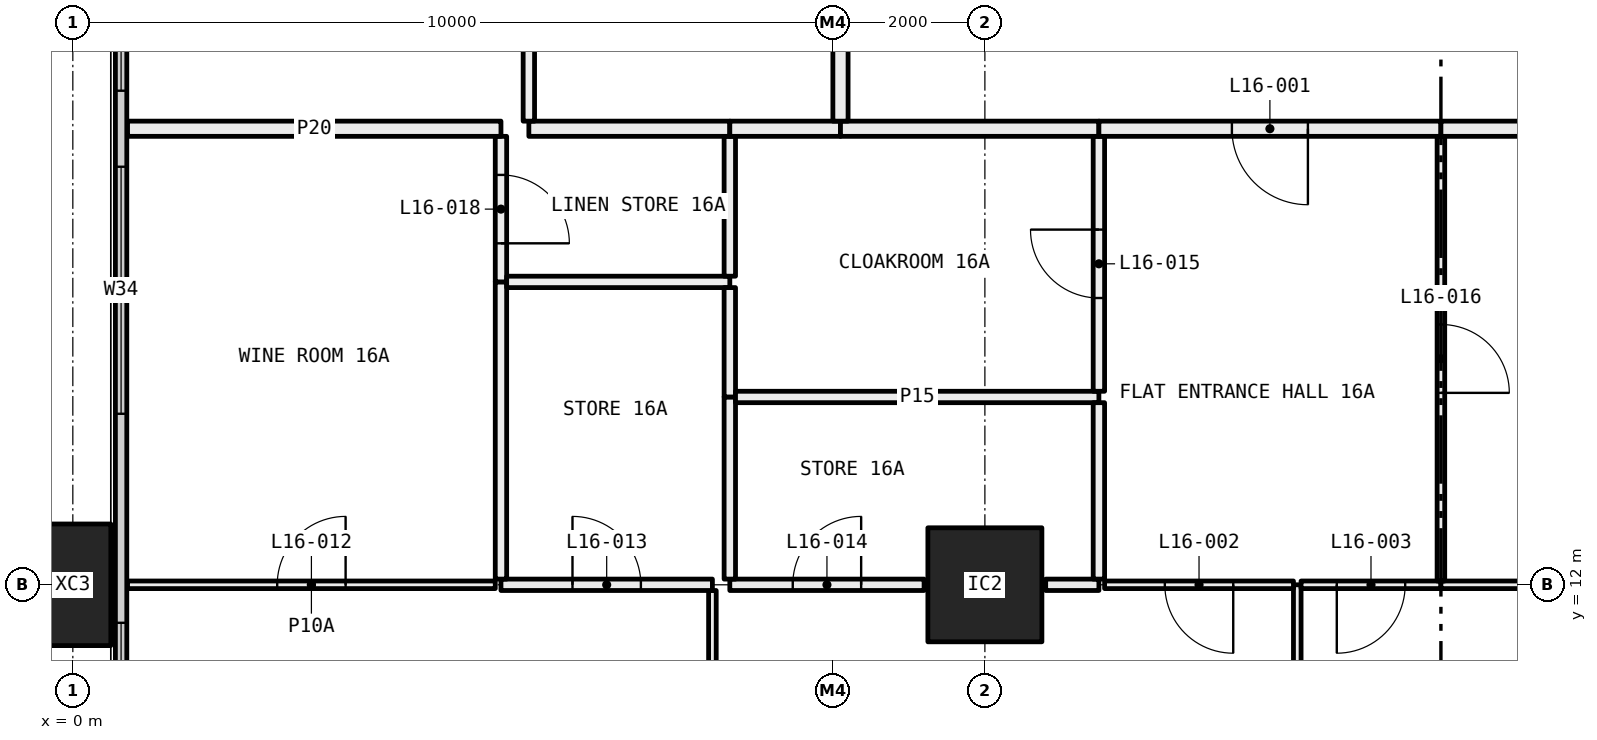
"""IFC4 building model, lengths in metres.
Left out: names, types, materials, properties, quantities, classifications, styles, units other than length and angle.
Written with IfcOpenShell. Run it as: python <this file> out.ifc"""

import sys

from ifc_helpers import new_model, si_unit, direction, frame, frame_2d, origin, origin_2d, place, context, subcontext, project, spatial, rectangle, hollow_rectangle, extrude, element, fill, save


model = new_model("IFC4")
c1 = context("Model", 3, precision=1e-05, world=origin(), true_north=direction((0.0, 1.0)))
c2 = subcontext(c1, "Body", "Model", "MODEL_VIEW")
j1 = project(units=[si_unit("LENGTHUNIT", "METRE"), si_unit("PLANEANGLEUNIT", "RADIAN")], contexts=[c1])
p1 = place(None, origin())
s1 = spatial("IfcSite", under=j1, at=p1, CompositionType="ELEMENT")
p2 = place(p1, origin())
s2 = spatial("IfcBuilding", under=s1, at=p2, CompositionType="ELEMENT")
p3 = place(p2, frame((0.0, 0.0, 67.95)))
s3 = spatial("IfcBuildingStorey", under=s2, at=p3, CompositionType="ELEMENT", Elevation=67.95)
p4 = place(p3, frame((0.0, 12.0, -0.4), z_axis=(0.0, 0.0, 1.0), x_axis=(0.0, 1.0, 0.0)))
e1 = element("IfcColumn", 1, at=p4, inside=s3, PredefinedType="COLUMN", context=c2, shape_type="SweptSolid", body=[
    extrude(hollow_rectangle(XDim=1.6, YDim=1.0, WallThickness=0.065, at=origin_2d()), origin(), (0.0, 0.0, 1.0), 3.45),
])
p5 = place(p3, frame((12.0, 12.0, 0.0), z_axis=(0.0, 0.0, 1.0), x_axis=(1.0, 0.0, 0.0)))
e2 = element("IfcColumn", 2, at=p5, inside=s3, PredefinedType="COLUMN", context=c2, shape_type="SweptSolid", body=[
    extrude(hollow_rectangle(XDim=1.5, YDim=1.5, WallThickness=0.065, at=origin_2d()), origin(), (0.0, 0.0, 1.0), 3.05),
])
p6 = place(p3, frame((0.635, 6.71, 0.0), z_axis=(0.0, 0.0, 1.0), x_axis=(0.0, 1.0, 0.0)))
e3 = element("IfcWall", 3, at=p6, inside=s3, PredefinedType="ELEMENTEDWALL", context=c2, shape_type="SweptSolid", body=[
    extrude(rectangle(XDim=34.58, YDim=0.15, at=frame_2d((17.29, 0.0))), origin(), (0.0, 0.0, 1.0), 3.05),
])
p7 = place(p6, frame((0.29, 0.0, 0.45)))
e4 = element("IfcOpeningElement", 4, at=p7, cuts=e3, PredefinedType="OPENING", context=c2, shape_type="SweptSolid", body=[
    extrude(rectangle(XDim=4.5, YDim=2.55, at=frame_2d((2.25, 1.275))), frame((0.0, 0.085, 0.0), z_axis=(0.0, -1.0, 0.0), x_axis=(1.0, 0.0, 0.0)), (0.0, 0.0, 1.0), 0.17),
])
p8 = place(p6, frame((7.54, 0.0, 0.45)))
e5 = element("IfcOpeningElement", 5, at=p8, cuts=e3, PredefinedType="OPENING", context=c2, shape_type="SweptSolid", body=[
    extrude(rectangle(XDim=3.25, YDim=2.55, at=frame_2d((1.625, 1.275))), frame((0.0, 0.085, 0.0), z_axis=(0.0, -1.0, 0.0), x_axis=(1.0, 0.0, 0.0)), (0.0, 0.0, 1.0), 0.17),
])
p9 = place(p6, frame((11.79, 0.0, 0.45)))
e6 = element("IfcOpeningElement", 6, at=p9, cuts=e3, PredefinedType="OPENING", context=c2, shape_type="SweptSolid", body=[
    extrude(rectangle(XDim=3.25, YDim=2.55, at=frame_2d((1.625, 1.275))), frame((0.0, 0.085, 0.0), z_axis=(0.0, -1.0, 0.0), x_axis=(1.0, 0.0, 0.0)), (0.0, 0.0, 1.0), 0.17),
])
p10 = place(p6, frame((19.54, 0.0, 0.45)))
e7 = element("IfcOpeningElement", 7, at=p10, cuts=e3, PredefinedType="OPENING", context=c2, shape_type="SweptSolid", body=[
    extrude(rectangle(XDim=3.25, YDim=2.55, at=frame_2d((1.625, 1.275))), frame((0.0, 0.085, 0.0), z_axis=(0.0, -1.0, 0.0), x_axis=(1.0, 0.0, 0.0)), (0.0, 0.0, 1.0), 0.17),
])
p11 = place(p6, frame((23.79, 0.0, 0.45)))
e8 = element("IfcOpeningElement", 8, at=p11, cuts=e3, PredefinedType="OPENING", context=c2, shape_type="SweptSolid", body=[
    extrude(rectangle(XDim=2.0, YDim=2.55, at=frame_2d((1.0, 1.275))), frame((0.0, 0.085, 0.0), z_axis=(0.0, -1.0, 0.0), x_axis=(1.0, 0.0, 0.0)), (0.0, 0.0, 1.0), 0.17),
])
p12 = place(p6, frame((29.79, 0.0, 0.45)))
e9 = element("IfcOpeningElement", 9, at=p12, cuts=e3, PredefinedType="OPENING", context=c2, shape_type="SweptSolid", body=[
    extrude(rectangle(XDim=4.5, YDim=2.55, at=frame_2d((2.25, 1.275))), frame((0.0, 0.085, 0.0), z_axis=(0.0, -1.0, 0.0), x_axis=(1.0, 0.0, 0.0)), (0.0, 0.0, 1.0), 0.17),
])
p13 = place(p3, frame((8.415, 6.05, 0.0), z_axis=(0.0, 0.0, 1.0), x_axis=(0.0, 1.0, 0.0)))
e10 = element("IfcWall", 10, at=p13, inside=s3, PredefinedType="PARTITIONING", context=c2, shape_type="SweptSolid", body=[
    extrude(rectangle(XDim=5.875, YDim=0.1, at=frame_2d((2.938, 0.0))), origin(), (0.0, 0.0, 1.0), 2.45),
])
p14 = place(p13, frame((2.488, 0.0, 0.0)))
e11 = element("IfcOpeningElement", 11, at=p14, cuts=e10, PredefinedType="OPENING", context=c2, shape_type="SweptSolid", body=[
    extrude(rectangle(XDim=0.9, YDim=2.1, at=frame_2d((0.45, 1.05))), frame((0.0, 0.06, 0.0), z_axis=(0.0, -1.0, 0.0), x_axis=(1.0, 0.0, 0.0)), (0.0, 0.0, 1.0), 0.12),
])
p15 = place(p3, frame((5.558, 12.0, 0.0), z_axis=(0.0, 0.0, 1.0), x_axis=(-1.0, 0.0, 0.0)))
e12 = element("IfcWall", 12, at=p15, inside=s3, PredefinedType="PARTITIONING", context=c2, shape_type="SweptSolid", body=[
    extrude(rectangle(XDim=4.838, YDim=0.1, at=frame_2d((2.419, 0.0))), origin(), (0.0, 0.0, 1.0), 2.45),
])
p16 = place(p15, frame((1.969, 0.0, 0.0)))
e13 = element("IfcOpeningElement", 13, at=p16, cuts=e12, PredefinedType="OPENING", context=c2, shape_type="SweptSolid", body=[
    extrude(rectangle(XDim=0.9, YDim=2.1, at=frame_2d((0.45, 1.05))), frame((0.0, 0.06, 0.0), z_axis=(0.0, -1.0, 0.0), x_axis=(1.0, 0.0, 0.0)), (0.0, 0.0, 1.0), 0.12),
])
p17 = place(p3, frame((8.415, 12.0, 0.0), z_axis=(0.0, 0.0, 1.0), x_axis=(-1.0, 0.0, 0.0)))
e14 = element("IfcWall", 14, at=p17, inside=s3, PredefinedType="PARTITIONING", context=c2, shape_type="SweptSolid", body=[
    extrude(rectangle(XDim=2.782, YDim=0.15, at=frame_2d((1.391, 0.0))), origin(), (0.0, 0.0, 1.0), 2.45),
])
p18 = place(p17, frame((0.941, 0.0, 0.0)))
e15 = element("IfcOpeningElement", 15, at=p18, cuts=e14, PredefinedType="OPENING", context=c2, shape_type="SweptSolid", body=[
    extrude(rectangle(XDim=0.9, YDim=2.1, at=frame_2d((0.45, 1.05))), frame((0.0, 0.085, 0.0), z_axis=(0.0, -1.0, 0.0), x_axis=(1.0, 0.0, 0.0)), (0.0, 0.0, 1.0), 0.17),
])
p19 = place(p3, frame((16.11, 6.05, 0.0), z_axis=(0.0, 0.0, 1.0), x_axis=(0.0, 1.0, 0.0)))
e16 = element("IfcWall", 16, at=p19, inside=s3, PredefinedType="PARTITIONING", context=c2, shape_type="SweptSolid", body=[
    extrude(rectangle(XDim=5.95, YDim=0.1, at=frame_2d((2.975, 0.0))), origin(), (0.0, 0.0, 1.0), 2.45),
])
p20 = place(p3, frame((11.2, 12.0, 0.0), z_axis=(0.0, 0.0, 1.0), x_axis=(-1.0, 0.0, 0.0)))
e17 = element("IfcWall", 17, at=p20, inside=s3, PredefinedType="PARTITIONING", context=c2, shape_type="SweptSolid", body=[
    extrude(rectangle(XDim=2.556, YDim=0.15, at=frame_2d((1.278, 0.0))), origin(), (0.0, 0.0, 1.0), 2.45),
])
p21 = place(p20, frame((0.828, 0.0, 0.0)))
e18 = element("IfcOpeningElement", 18, at=p21, cuts=e17, PredefinedType="OPENING", context=c2, shape_type="SweptSolid", body=[
    extrude(rectangle(XDim=0.9, YDim=2.1, at=frame_2d((0.45, 1.05))), frame((0.0, 0.085, 0.0), z_axis=(0.0, -1.0, 0.0), x_axis=(1.0, 0.0, 0.0)), (0.0, 0.0, 1.0), 0.17),
])
p22 = place(p3, frame((13.5, 12.0, 0.0), z_axis=(0.0, 0.0, 1.0), x_axis=(-1.0, 0.0, 0.0)))
e19 = element("IfcWall", 19, at=p22, inside=s3, PredefinedType="PARTITIONING", context=c2, shape_type="SweptSolid", body=[
    extrude(rectangle(XDim=0.7, YDim=0.15, at=frame_2d((0.35, 0.0))), origin(), (0.0, 0.0, 1.0), 2.45),
])
p23 = place(p3, frame((16.06, 12.0, 0.0), z_axis=(0.0, 0.0, 1.0), x_axis=(-1.0, 0.0, 0.0)))
e20 = element("IfcWall", 20, at=p23, inside=s3, PredefinedType="PARTITIONING", context=c2, shape_type="SweptSolid", body=[
    extrude(rectangle(XDim=2.485, YDim=0.1, at=frame_2d((1.243, 0.0))), origin(), (0.0, 0.0, 1.0), 2.45),
])
p24 = place(p23, frame((0.792, 0.0, 0.0)))
e21 = element("IfcOpeningElement", 21, at=p24, cuts=e20, PredefinedType="OPENING", context=c2, shape_type="SweptSolid", body=[
    extrude(rectangle(XDim=0.9, YDim=2.1, at=frame_2d((0.45, 1.05))), frame((0.0, 0.06, 0.0), z_axis=(0.0, -1.0, 0.0), x_axis=(1.0, 0.0, 0.0)), (0.0, 0.0, 1.0), 0.12),
])
p25 = place(p3, frame((18.0, 12.0, 0.0), z_axis=(0.0, 0.0, 1.0), x_axis=(-1.0, 0.0, 0.0)))
e22 = element("IfcWall", 22, at=p25, inside=s3, PredefinedType="PARTITIONING", context=c2, shape_type="SweptSolid", body=[
    extrude(rectangle(XDim=1.84, YDim=0.1, at=frame_2d((0.92, 0.0))), origin(), (0.0, 0.0, 1.0), 2.45),
])
p26 = place(p25, frame((0.47, 0.0, 0.0)))
e23 = element("IfcOpeningElement", 23, at=p26, cuts=e22, PredefinedType="OPENING", context=c2, shape_type="SweptSolid", body=[
    extrude(rectangle(XDim=0.9, YDim=2.1, at=frame_2d((0.45, 1.05))), frame((0.0, 0.06, 0.0), z_axis=(0.0, -1.0, 0.0), x_axis=(1.0, 0.0, 0.0)), (0.0, 0.0, 1.0), 0.12),
])
p27 = place(p3, frame((23.2, 12.0, 0.0), z_axis=(0.0, 0.0, 1.0), x_axis=(-1.0, 0.0, 0.0)))
e24 = element("IfcWall", 24, at=p27, inside=s3, PredefinedType="PARTITIONING", context=c2, shape_type="SweptSolid", body=[
    extrude(rectangle(XDim=5.2, YDim=0.1, at=frame_2d((2.6, 0.0))), origin(), (0.0, 0.0, 1.0), 2.45),
])
p28 = place(p3, frame((5.633, 12.075, 0.0), z_axis=(0.0, 0.0, 1.0), x_axis=(0.0, 1.0, 0.0)))
e25 = element("IfcWall", 25, at=p28, inside=s3, PredefinedType="PARTITIONING", context=c2, shape_type="SweptSolid", body=[
    extrude(rectangle(XDim=3.91, YDim=0.15, at=frame_2d((1.955, 0.0))), origin(), (0.0, 0.0, 1.0), 2.45),
])
p29 = place(p3, frame((5.633, 15.985, 0.0), z_axis=(0.0, 0.0, 1.0), x_axis=(0.0, 1.0, 0.0)))
e26 = element("IfcWall", 26, at=p29, inside=s3, PredefinedType="PARTITIONING", context=c2, shape_type="SweptSolid", body=[
    extrude(rectangle(XDim=1.915, YDim=0.15, at=frame_2d((0.958, 0.0))), origin(), (0.0, 0.0, 1.0), 3.05),
])
p30 = place(p29, frame((0.508, 0.0, 0.0)))
e27 = element("IfcOpeningElement", 27, at=p30, cuts=e26, PredefinedType="OPENING", context=c2, shape_type="SweptSolid", body=[
    extrude(rectangle(XDim=0.9, YDim=2.1, at=frame_2d((0.45, 1.05))), frame((0.0, 0.085, 0.0), z_axis=(0.0, -1.0, 0.0), x_axis=(1.0, 0.0, 0.0)), (0.0, 0.0, 1.0), 0.17),
])
p31 = place(p3, frame((5.633, 18.0, 0.0), z_axis=(0.0, 0.0, 1.0), x_axis=(-1.0, 0.0, 0.0)))
e28 = element("IfcWall", 28, at=p31, inside=s3, PredefinedType="PARTITIONING", context=c2, shape_type="SweptSolid", body=[
    extrude(rectangle(XDim=4.913, YDim=0.2, at=frame_2d((2.457, 0.0))), origin(), (0.0, 0.0, 1.0), 3.05),
])
p32 = place(p3, frame((8.644, 15.985, 0.0), z_axis=(0.0, 0.0, 1.0), x_axis=(-1.0, 0.0, 0.0)))
e29 = element("IfcWall", 29, at=p32, inside=s3, PredefinedType="PARTITIONING", context=c2, shape_type="SweptSolid", body=[
    extrude(rectangle(XDim=2.936, YDim=0.15, at=frame_2d((1.468, 0.0))), origin(), (0.0, 0.0, 1.0), 3.05),
])
p33 = place(p3, frame((8.644, 12.075, 0.0), z_axis=(0.0, 0.0, 1.0), x_axis=(0.0, 1.0, 0.0)))
e30 = element("IfcWall", 30, at=p33, inside=s3, PredefinedType="PARTITIONING", context=c2, shape_type="SweptSolid", body=[
    extrude(rectangle(XDim=2.396, YDim=0.15, at=frame_2d((1.198, 0.0))), origin(), (0.0, 0.0, 1.0), 2.45),
])
p34 = place(p3, frame((8.644, 14.471, 0.0), z_axis=(0.0, 0.0, 1.0), x_axis=(0.0, 1.0, 0.0)))
e31 = element("IfcWall", 31, at=p34, inside=s3, PredefinedType="PARTITIONING", context=c2, shape_type="SweptSolid", body=[
    extrude(rectangle(XDim=1.439, YDim=0.15, at=frame_2d((0.719, 0.0))), origin(), (0.0, 0.0, 1.0), 3.05),
])
p35 = place(p3, frame((8.644, 16.06, 0.0), z_axis=(0.0, 0.0, 1.0), x_axis=(0.0, 1.0, 0.0)))
e32 = element("IfcWall", 32, at=p35, inside=s3, PredefinedType="PARTITIONING", context=c2, shape_type="SweptSolid", body=[
    extrude(rectangle(XDim=1.84, YDim=0.15, at=frame_2d((0.92, 0.0))), origin(), (0.0, 0.0, 1.0), 3.05),
])
p36 = place(p3, frame((8.644, 18.0, 0.0), z_axis=(0.0, 0.0, 1.0), x_axis=(-1.0, 0.0, 0.0)))
e33 = element("IfcWall", 33, at=p36, inside=s3, PredefinedType="PARTITIONING", context=c2, shape_type="SweptSolid", body=[
    extrude(rectangle(XDim=2.644, YDim=0.2, at=frame_2d((1.322, 0.0))), origin(), (0.0, 0.0, 1.0), 3.05),
])
p37 = place(p3, frame((13.5, 14.471, 0.0), z_axis=(0.0, 0.0, 1.0), x_axis=(-1.0, 0.0, 0.0)))
e34 = element("IfcWall", 34, at=p37, inside=s3, PredefinedType="PARTITIONING", context=c2, shape_type="SweptSolid", body=[
    extrude(rectangle(XDim=4.781, YDim=0.15, at=frame_2d((2.391, 0.0))), origin(), (0.0, 0.0, 1.0), 3.05),
])
p38 = place(p3, frame((13.5, 12.075, 0.0), z_axis=(0.0, 0.0, 1.0), x_axis=(0.0, 1.0, 0.0)))
e35 = element("IfcWall", 35, at=p38, inside=s3, PredefinedType="PARTITIONING", context=c2, shape_type="SweptSolid", body=[
    extrude(rectangle(XDim=2.321, YDim=0.15, at=frame_2d((1.161, 0.0))), origin(), (0.0, 0.0, 1.0), 2.45),
])
p39 = place(p3, frame((13.5, 14.546, 0.0), z_axis=(0.0, 0.0, 1.0), x_axis=(0.0, 1.0, 0.0)))
e36 = element("IfcWall", 36, at=p39, inside=s3, PredefinedType="PARTITIONING", context=c2, shape_type="SweptSolid", body=[
    extrude(rectangle(XDim=3.354, YDim=0.15, at=frame_2d((1.677, 0.0))), origin(), (0.0, 0.0, 1.0), 3.05),
])
p40 = place(p39, frame((1.227, 0.0, 0.0)))
e37 = element("IfcOpeningElement", 37, at=p40, cuts=e36, PredefinedType="OPENING", context=c2, shape_type="SweptSolid", body=[
    extrude(rectangle(XDim=0.9, YDim=2.1, at=frame_2d((0.45, 1.05))), frame((0.0, 0.085, 0.0), z_axis=(0.0, -1.0, 0.0), x_axis=(1.0, 0.0, 0.0)), (0.0, 0.0, 1.0), 0.17),
])
p41 = place(p3, frame((10.1, 18.0, 0.0), z_axis=(0.0, 0.0, 1.0), x_axis=(-1.0, 0.0, 0.0)))
e38 = element("IfcWall", 38, at=p41, inside=s3, PredefinedType="PARTITIONING", context=c2, shape_type="SweptSolid", body=[
    extrude(rectangle(XDim=1.456, YDim=0.2, at=frame_2d((0.728, 0.0))), origin(), (0.0, 0.0, 1.0), 3.05),
])
p42 = place(p3, frame((13.5, 18.0, 0.0), z_axis=(0.0, 0.0, 1.0), x_axis=(-1.0, 0.0, 0.0)))
e39 = element("IfcWall", 39, at=p42, inside=s3, PredefinedType="PARTITIONING", context=c2, shape_type="SweptSolid", body=[
    extrude(rectangle(XDim=3.4, YDim=0.2, at=frame_2d((1.7, 0.0))), origin(), (0.0, 0.0, 1.0), 3.05),
])
p43 = place(p3, frame((18.0, 12.05, 0.0), z_axis=(0.0, 0.0, 1.0), x_axis=(0.0, 1.0, 0.0)))
e40 = element("IfcWall", 40, at=p43, inside=s3, PredefinedType="PARTITIONING", context=c2, shape_type="SweptSolid", body=[
    extrude(rectangle(XDim=5.85, YDim=0.1, at=frame_2d((2.925, 0.0))), origin(), (0.0, 0.0, 1.0), 2.45),
])
p44 = place(p43, frame((2.475, 0.0, 0.0)))
e41 = element("IfcOpeningElement", 41, at=p44, cuts=e40, PredefinedType="OPENING", context=c2, shape_type="SweptSolid", body=[
    extrude(rectangle(XDim=0.9, YDim=2.1, at=frame_2d((0.45, 1.05))), frame((0.0, 0.06, 0.0), z_axis=(0.0, -1.0, 0.0), x_axis=(1.0, 0.0, 0.0)), (0.0, 0.0, 1.0), 0.12),
])
p45 = place(p3, frame((18.0, 18.0, 0.0), z_axis=(0.0, 0.0, 1.0), x_axis=(-1.0, 0.0, 0.0)))
e42 = element("IfcWall", 42, at=p45, inside=s3, PredefinedType="PARTITIONING", context=c2, shape_type="SweptSolid", body=[
    extrude(rectangle(XDim=4.5, YDim=0.2, at=frame_2d((2.25, 0.0))), origin(), (0.0, 0.0, 1.0), 3.05),
])
p46 = place(p45, frame((1.75, 0.0, 0.0)))
e43 = element("IfcOpeningElement", 43, at=p46, cuts=e42, PredefinedType="OPENING", context=c2, shape_type="SweptSolid", body=[
    extrude(rectangle(XDim=1.0, YDim=2.1, at=frame_2d((0.5, 1.05))), frame((0.0, 0.11, 0.0), z_axis=(0.0, -1.0, 0.0), x_axis=(1.0, 0.0, 0.0)), (0.0, 0.0, 1.0), 0.22),
])
p47 = place(p3, frame((25.9, 18.0, 0.0), z_axis=(0.0, 0.0, 1.0), x_axis=(-1.0, 0.0, 0.0)))
e44 = element("IfcWall", 44, at=p47, inside=s3, PredefinedType="PARTITIONING", context=c2, shape_type="SweptSolid", body=[
    extrude(rectangle(XDim=7.9, YDim=0.2, at=frame_2d((3.95, 0.0))), origin(), (0.0, 0.0, 1.0), 3.05),
])
p48 = place(p3, frame((6.0, 18.1, 0.0), z_axis=(0.0, 0.0, 1.0), x_axis=(0.0, 1.0, 0.0)))
e45 = element("IfcWall", 45, at=p48, inside=s3, PredefinedType="PARTITIONING", context=c2, shape_type="SweptSolid", body=[
    extrude(rectangle(XDim=4.4, YDim=0.15, at=frame_2d((2.2, 0.0))), origin(), (0.0, 0.0, 1.0), 3.05),
])
p49 = place(p48, frame((1.75, 0.0, 0.0)))
e46 = element("IfcOpeningElement", 46, at=p49, cuts=e45, PredefinedType="OPENING", context=c2, shape_type="SweptSolid", body=[
    extrude(rectangle(XDim=0.9, YDim=2.1, at=frame_2d((0.45, 1.05))), frame((0.0, 0.085, 0.0), z_axis=(0.0, -1.0, 0.0), x_axis=(1.0, 0.0, 0.0)), (0.0, 0.0, 1.0), 0.17),
])
p50 = place(p3, frame((10.1, 18.1, 0.0), z_axis=(0.0, 0.0, 1.0), x_axis=(0.0, 1.0, 0.0)))
e47 = element("IfcWall", 47, at=p50, inside=s3, PredefinedType="PARTITIONING", context=c2, shape_type="SweptSolid", body=[
    extrude(rectangle(XDim=4.4, YDim=0.2, at=frame_2d((2.2, 0.0))), origin(), (0.0, 0.0, 1.0), 3.05),
])
p51 = place(p7, origin())
e48 = element("IfcWindow", 48, at=p51, inside=s3, PartitioningType="SINGLE_PANEL", PredefinedType="WINDOW", context=c2, shape_type="SweptSolid", body=[
    extrude(rectangle(XDim=4.5, YDim=2.55, at=frame_2d((2.25, 1.275))), frame((0.0, 0.03, 0.0), z_axis=(0.0, -1.0, 0.0), x_axis=(1.0, 0.0, 0.0)), (0.0, 0.0, 1.0), 0.06),
])
fill(e4, e48)
p52 = place(p8, origin())
e49 = element("IfcWindow", 49, at=p52, inside=s3, PartitioningType="SINGLE_PANEL", PredefinedType="WINDOW", context=c2, shape_type="SweptSolid", body=[
    extrude(rectangle(XDim=3.25, YDim=2.55, at=frame_2d((1.625, 1.275))), frame((0.0, 0.03, 0.0), z_axis=(0.0, -1.0, 0.0), x_axis=(1.0, 0.0, 0.0)), (0.0, 0.0, 1.0), 0.06),
])
fill(e5, e49)
p53 = place(p9, origin())
e50 = element("IfcWindow", 50, at=p53, inside=s3, PartitioningType="SINGLE_PANEL", PredefinedType="WINDOW", context=c2, shape_type="SweptSolid", body=[
    extrude(rectangle(XDim=3.25, YDim=2.55, at=frame_2d((1.625, 1.275))), frame((0.0, 0.03, 0.0), z_axis=(0.0, -1.0, 0.0), x_axis=(1.0, 0.0, 0.0)), (0.0, 0.0, 1.0), 0.06),
])
fill(e6, e50)
p54 = place(p46, origin())
e51 = element("IfcDoor", 51, at=p54, inside=s3, OperationType="SINGLE_SWING_RIGHT", PredefinedType="DOOR", context=c2, shape_type="SweptSolid", body=[
    extrude(rectangle(XDim=1.0, YDim=2.1, at=frame_2d((0.5, 1.05))), frame((0.0, 0.025, 0.0), z_axis=(0.0, -1.0, 0.0), x_axis=(1.0, 0.0, 0.0)), (0.0, 0.0, 1.0), 0.05),
])
fill(e43, e51)
p55 = place(p24, origin())
e52 = element("IfcDoor", 52, at=p55, inside=s3, OperationType="SINGLE_SWING_RIGHT", PredefinedType="DOOR", context=c2, shape_type="SweptSolid", body=[
    extrude(rectangle(XDim=0.9, YDim=2.1, at=frame_2d((0.45, 1.05))), frame((0.0, 0.025, 0.0), z_axis=(0.0, -1.0, 0.0), x_axis=(1.0, 0.0, 0.0)), (0.0, 0.0, 1.0), 0.05),
])
fill(e21, e52)
p56 = place(p26, origin())
e53 = element("IfcDoor", 53, at=p56, inside=s3, OperationType="SINGLE_SWING_LEFT", PredefinedType="DOOR", context=c2, shape_type="SweptSolid", body=[
    extrude(rectangle(XDim=0.9, YDim=2.1, at=frame_2d((0.45, 1.05))), frame((0.0, 0.025, 0.0), z_axis=(0.0, -1.0, 0.0), x_axis=(1.0, 0.0, 0.0)), (0.0, 0.0, 1.0), 0.05),
])
fill(e23, e53)
p57 = place(p16, frame((0.9, 0.0, 0.0), x_axis=(-1.0, 0.0, 0.0)))
e54 = element("IfcDoor", 54, at=p57, inside=s3, OperationType="SINGLE_SWING_LEFT", PredefinedType="DOOR", context=c2, shape_type="SweptSolid", body=[
    extrude(rectangle(XDim=0.9, YDim=2.1, at=frame_2d((0.45, 1.05))), frame((0.0, 0.025, 0.0), z_axis=(0.0, -1.0, 0.0), x_axis=(1.0, 0.0, 0.0)), (0.0, 0.0, 1.0), 0.05),
])
fill(e13, e54)
p58 = place(p18, frame((0.9, 0.0, 0.0), x_axis=(-1.0, 0.0, 0.0)))
e55 = element("IfcDoor", 55, at=p58, inside=s3, OperationType="SINGLE_SWING_RIGHT", PredefinedType="DOOR", context=c2, shape_type="SweptSolid", body=[
    extrude(rectangle(XDim=0.9, YDim=2.1, at=frame_2d((0.45, 1.05))), frame((0.0, 0.025, 0.0), z_axis=(0.0, -1.0, 0.0), x_axis=(1.0, 0.0, 0.0)), (0.0, 0.0, 1.0), 0.05),
])
fill(e15, e55)
p59 = place(p21, frame((0.9, 0.0, 0.0), x_axis=(-1.0, 0.0, 0.0)))
e56 = element("IfcDoor", 56, at=p59, inside=s3, OperationType="SINGLE_SWING_LEFT", PredefinedType="DOOR", context=c2, shape_type="SweptSolid", body=[
    extrude(rectangle(XDim=0.9, YDim=2.1, at=frame_2d((0.45, 1.05))), frame((0.0, 0.025, 0.0), z_axis=(0.0, -1.0, 0.0), x_axis=(1.0, 0.0, 0.0)), (0.0, 0.0, 1.0), 0.05),
])
fill(e18, e56)
p60 = place(p40, origin())
e57 = element("IfcDoor", 57, at=p60, inside=s3, OperationType="SINGLE_SWING_LEFT", PredefinedType="DOOR", context=c2, shape_type="SweptSolid", body=[
    extrude(rectangle(XDim=0.9, YDim=2.1, at=frame_2d((0.45, 1.05))), frame((0.0, 0.025, 0.0), z_axis=(0.0, -1.0, 0.0), x_axis=(1.0, 0.0, 0.0)), (0.0, 0.0, 1.0), 0.05),
])
fill(e37, e57)
p61 = place(p44, frame((0.9, 0.0, 0.0), x_axis=(-1.0, 0.0, 0.0)))
e58 = element("IfcDoor", 58, at=p61, inside=s3, OperationType="SINGLE_SWING_LEFT", PredefinedType="DOOR", context=c2, shape_type="SweptSolid", body=[
    extrude(rectangle(XDim=0.9, YDim=2.1, at=frame_2d((0.45, 1.05))), frame((0.0, 0.025, 0.0), z_axis=(0.0, -1.0, 0.0), x_axis=(1.0, 0.0, 0.0)), (0.0, 0.0, 1.0), 0.05),
])
fill(e41, e58)
p62 = place(p30, frame((0.9, 0.0, 0.0), x_axis=(-1.0, 0.0, 0.0)))
e59 = element("IfcDoor", 59, at=p62, inside=s3, OperationType="SINGLE_SWING_LEFT", PredefinedType="DOOR", context=c2, shape_type="SweptSolid", body=[
    extrude(rectangle(XDim=0.9, YDim=2.1, at=frame_2d((0.45, 1.05))), frame((0.0, 0.025, 0.0), z_axis=(0.0, -1.0, 0.0), x_axis=(1.0, 0.0, 0.0)), (0.0, 0.0, 1.0), 0.05),
])
fill(e27, e59)
save(model, sys.argv[1])
